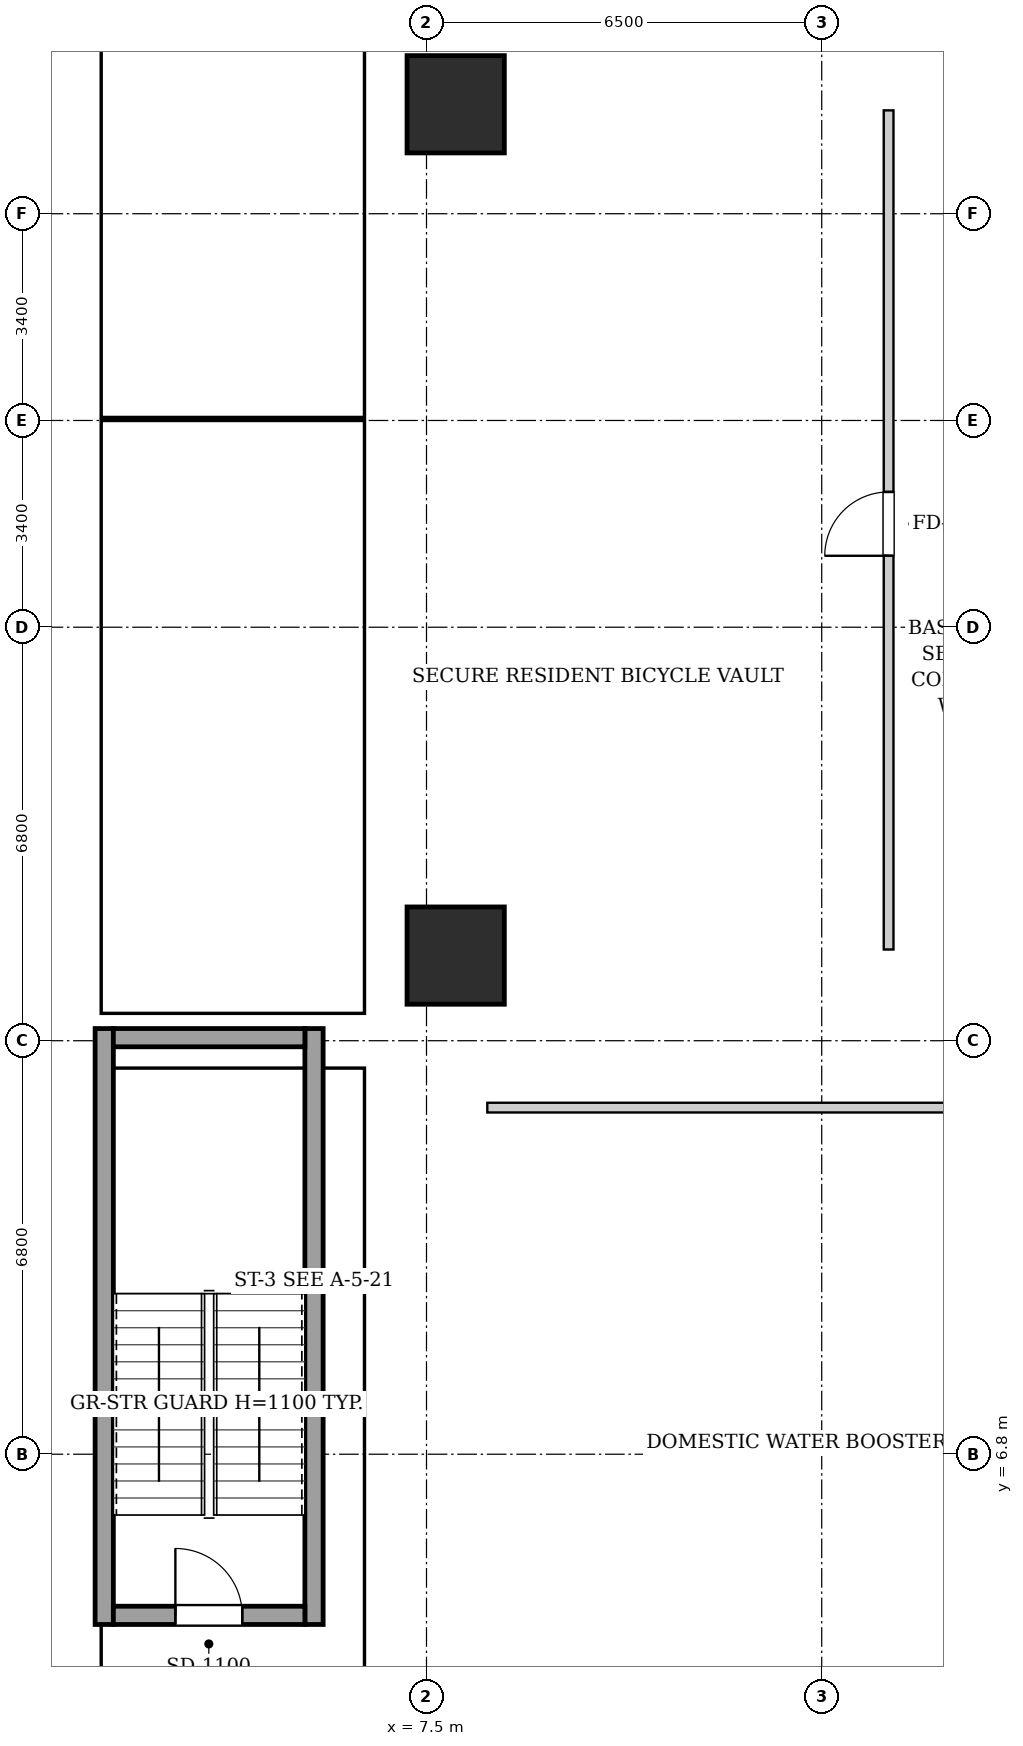
"""IFC4 building model, lengths in metres.
Left out: names, types, materials, properties, quantities, classifications, styles, units other than length and angle.
Written with IfcOpenShell. Run it as: python <this file> out.ifc"""

import sys

from ifc_helpers import new_model, si_unit, direction, frame, frame_2d, origin, origin_2d, place, context, subcontext, project, spatial, rectangle, extrude, element, fill, save


model = new_model("IFC4")
c1 = context("Model", 3, precision=1e-05, world=origin(), true_north=direction((0.0, 1.0)))
c2 = subcontext(c1, "Body", "Model", "MODEL_VIEW")
j1 = project(units=[si_unit("LENGTHUNIT", "METRE"), si_unit("PLANEANGLEUNIT", "RADIAN")], contexts=[c1])
p1 = place(None, origin())
s1 = spatial("IfcSite", under=j1, at=p1, CompositionType="ELEMENT")
p2 = place(p1, origin())
s2 = spatial("IfcBuilding", under=s1, at=p2, CompositionType="ELEMENT")
p3 = place(p2, frame((0.0, 0.0, -9.6)))
s3 = spatial("IfcBuildingStorey", under=s2, at=p3, CompositionType="ELEMENT", Elevation=-9.6)
for number, where, z_axis, x_axis in (
    (1, (7.98, 15.0, 0.0), (0.0, 0.0, 1.0), (1.0, 0.0, 0.0)),
    (2, (7.98, 29.0, 0.0), (0.0, 0.0, 1.0), (1.0, 0.0, 0.0)),
):
    element("IfcColumn", number, at=place(p3, frame(where, z_axis=z_axis, x_axis=x_axis)), inside=s3, PredefinedType="COLUMN", context=c2, shape_type="SweptSolid", body=[
        extrude(rectangle(XDim=1.6, YDim=1.6, at=origin_2d()), origin(), (0.0, 0.0, 1.0), 4.8),
    ])
for number, where, z_axis, x_axis in (
    (3, (2.2, 4.0, 0.0), (0.0, 0.0, 1.0), (0.0, 1.0, 0.0)),
    (4, (5.65, 4.0, 0.0), (0.0, 0.0, 1.0), (0.0, 1.0, 0.0)),
):
    element("IfcWall", number, at=place(p3, frame(where, z_axis=z_axis, x_axis=x_axis)), inside=s3, PredefinedType="SHEAR", context=c2, shape_type="SweptSolid", body=[
        extrude(rectangle(XDim=9.8, YDim=0.3, at=frame_2d((4.9, 0.0))), origin(), (0.0, 0.0, 1.0), 4.48),
    ])
p4 = place(p3, frame((2.35, 13.65, 0.0), z_axis=(0.0, 0.0, 1.0), x_axis=(1.0, 0.0, 0.0)))
e5 = element("IfcWall", 5, at=p4, inside=s3, PredefinedType="SHEAR", context=c2, shape_type="SweptSolid", body=[
    extrude(rectangle(XDim=3.15, YDim=0.3, at=frame_2d((1.575, 0.0))), origin(), (0.0, 0.0, 1.0), 4.48),
])
p5 = place(p3, frame((2.35, 4.15, 0.0), z_axis=(0.0, 0.0, 1.0), x_axis=(1.0, 0.0, 0.0)))
e6 = element("IfcWall", 6, at=p5, inside=s3, PredefinedType="SHEAR", context=c2, shape_type="SweptSolid", body=[
    extrude(rectangle(XDim=3.15, YDim=0.3, at=frame_2d((1.575, 0.0))), origin(), (0.0, 0.0, 1.0), 4.48),
])
p6 = place(p5, frame((1.02, 0.0, 0.0)))
e7 = element("IfcOpeningElement", 7, at=p6, cuts=e6, PredefinedType="OPENING", context=c2, shape_type="SweptSolid", body=[
    extrude(rectangle(XDim=1.1, YDim=2.05, at=frame_2d((0.55, 1.025))), frame((0.0, 0.16, 0.0), z_axis=(0.0, -1.0, 0.0), x_axis=(1.0, 0.0, 0.0)), (0.0, 0.0, 1.0), 0.32),
])
p7 = place(p3, frame((8.5, 12.5, 0.0), z_axis=(0.0, 0.0, 1.0), x_axis=(1.0, 0.0, 0.0)))
e8 = element("IfcWall", 8, at=p7, inside=s3, PredefinedType="PARTITIONING", context=c2, shape_type="SweptSolid", body=[
    extrude(rectangle(XDim=37.0, YDim=0.16, at=frame_2d((18.5, 0.0))), origin(), (0.0, 0.0, 1.0), 4.48),
])
p8 = place(p7, frame((8.975, 0.0, 0.0)))
e9 = element("IfcOpeningElement", 9, at=p8, cuts=e8, PredefinedType="OPENING", context=c2, shape_type="SweptSolid", body=[
    extrude(rectangle(XDim=1.05, YDim=2.05, at=frame_2d((0.525, 1.025))), frame((0.0, 0.09, 0.0), z_axis=(0.0, -1.0, 0.0), x_axis=(1.0, 0.0, 0.0)), (0.0, 0.0, 1.0), 0.18),
])
p9 = place(p7, frame((26.975, 0.0, 0.0)))
e10 = element("IfcOpeningElement", 10, at=p9, cuts=e8, PredefinedType="OPENING", context=c2, shape_type="SweptSolid", body=[
    extrude(rectangle(XDim=1.05, YDim=2.05, at=frame_2d((0.525, 1.025))), frame((0.0, 0.09, 0.0), z_axis=(0.0, -1.0, 0.0), x_axis=(1.0, 0.0, 0.0)), (0.0, 0.0, 1.0), 0.18),
])
p10 = place(p3, frame((15.1, 15.1, 0.0), z_axis=(0.0, 0.0, 1.0), x_axis=(0.0, 1.0, 0.0)))
e11 = element("IfcWall", 11, at=p10, inside=s3, PredefinedType="PARTITIONING", context=c2, shape_type="SweptSolid", body=[
    extrude(rectangle(XDim=13.8, YDim=0.16, at=frame_2d((6.9, 0.0))), origin(), (0.0, 0.0, 1.0), 4.48),
])
p11 = place(p10, frame((6.475, 0.0, 0.0)))
e12 = element("IfcOpeningElement", 12, at=p11, cuts=e11, PredefinedType="OPENING", context=c2, shape_type="SweptSolid", body=[
    extrude(rectangle(XDim=1.05, YDim=2.05, at=frame_2d((0.525, 1.025))), frame((0.0, 0.09, 0.0), z_axis=(0.0, -1.0, 0.0), x_axis=(1.0, 0.0, 0.0)), (0.0, 0.0, 1.0), 0.18),
])
p12 = place(p6, origin())
e13 = element("IfcDoor", 13, at=p12, inside=s3, OperationType="SINGLE_SWING_LEFT", PredefinedType="DOOR", context=c2, shape_type="SweptSolid", body=[
    extrude(rectangle(XDim=1.1, YDim=2.05, at=frame_2d((0.55, 1.025))), frame((0.0, 0.025, 0.0), z_axis=(0.0, -1.0, 0.0), x_axis=(1.0, 0.0, 0.0)), (0.0, 0.0, 1.0), 0.05),
])
fill(e7, e13)
p13 = place(p11, origin())
e14 = element("IfcDoor", 14, at=p13, inside=s3, OperationType="SINGLE_SWING_LEFT", PredefinedType="DOOR", context=c2, shape_type="SweptSolid", body=[
    extrude(rectangle(XDim=1.05, YDim=2.05, at=frame_2d((0.525, 1.025))), frame((0.0, 0.025, 0.0), z_axis=(0.0, -1.0, 0.0), x_axis=(1.0, 0.0, 0.0)), (0.0, 0.0, 1.0), 0.05),
])
fill(e12, e14)
save(model, sys.argv[1])
